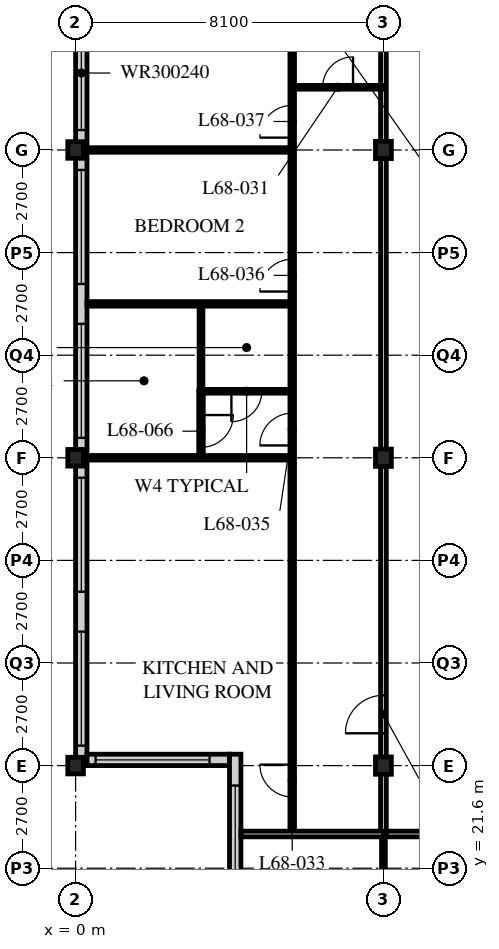
"""IFC4 building model, lengths in metres.
Left out: names, types, materials, properties, quantities, classifications, styles, units other than length and angle.
Written with IfcOpenShell. Run it as: python <this file> out.ifc"""

import sys

from ifc_helpers import new_model, si_unit, direction, frame, frame_2d, origin, origin_2d, place, context, subcontext, project, spatial, rectangle, i_section, extrude, element, fill, save


model = new_model("IFC4")
c1 = context("Model", 3, precision=1e-05, world=origin(), true_north=direction((0.0, 1.0)))
c2 = subcontext(c1, "Body", "Model", "MODEL_VIEW")
j1 = project(units=[si_unit("LENGTHUNIT", "METRE"), si_unit("PLANEANGLEUNIT", "RADIAN")], contexts=[c1])
p1 = place(None, origin())
s1 = spatial("IfcSite", under=j1, at=p1, CompositionType="ELEMENT")
p2 = place(p1, origin())
s2 = spatial("IfcBuilding", under=s1, at=p2, CompositionType="ELEMENT")
p3 = place(p2, frame((0.0, 0.0, 265.8)))
s3 = spatial("IfcBuildingStorey", under=s2, at=p3, CompositionType="ELEMENT", Elevation=265.8)
for number, where, z_axis, x_axis in (
    (1, (0.0, 24.3, 0.0), (0.0, 0.0, 1.0), (1.0, 0.0, 0.0)),
    (2, (0.0, 32.4, 0.0), (0.0, 0.0, 1.0), (1.0, 0.0, 0.0)),
    (3, (0.0, 40.5, 0.0), (0.0, 0.0, 1.0), (1.0, 0.0, 0.0)),
):
    element("IfcColumn", number, at=place(p3, frame(where, z_axis=z_axis, x_axis=x_axis)), inside=s3, PredefinedType="COLUMN", context=c2, shape_type="SweptSolid", body=[
        extrude(i_section(OverallWidth=0.412, OverallDepth=0.437, WebThickness=0.036, FlangeThickness=0.058, FilletRadius=0.015, at=origin_2d()), origin(), (0.0, 0.0, 1.0), 3.9),
    ])
for number, where, z_axis, x_axis in (
    (4, (8.1, 24.3, 0.0), (0.0, 0.0, 1.0), (1.0, 0.0, 0.0)),
    (5, (8.1, 32.4, 0.0), (0.0, 0.0, 1.0), (1.0, 0.0, 0.0)),
    (6, (8.1, 40.5, 0.0), (0.0, 0.0, 1.0), (1.0, 0.0, 0.0)),
):
    element("IfcColumn", number, at=place(p3, frame(where, z_axis=z_axis, x_axis=x_axis)), inside=s3, PredefinedType="COLUMN", context=c2, shape_type="SweptSolid", body=[
        extrude(i_section(OverallWidth=0.418, OverallDepth=0.456, WebThickness=0.042, FlangeThickness=0.067, FilletRadius=0.015, at=origin_2d()), origin(), (0.0, 0.0, 1.0), 3.9),
    ])
p4 = place(p3, frame((0.15, 56.4, 0.0), z_axis=(0.0, 0.0, 1.0), x_axis=(0.0, -1.0, 0.0)))
e7 = element("IfcWall", 7, at=p4, inside=s3, PredefinedType="SOLIDWALL", context=c2, shape_type="SweptSolid", body=[
    extrude(rectangle(XDim=32.1, YDim=0.3, at=frame_2d((16.05, 0.0))), origin(), (0.0, 0.0, 1.0), 3.69),
])
p5 = place(p4, frame((0.225, 0.0, 0.6)))
e8 = element("IfcOpeningElement", 8, at=p5, cuts=e7, PredefinedType="OPENING", context=c2, shape_type="SweptSolid", body=[
    extrude(rectangle(XDim=3.0, YDim=2.4, at=frame_2d((1.5, 1.2))), frame((0.0, 0.16, 0.0), z_axis=(0.0, -1.0, 0.0), x_axis=(1.0, 0.0, 0.0)), (0.0, 0.0, 1.0), 0.32),
])
p6 = place(p4, frame((4.275, 0.0, 0.6)))
e9 = element("IfcOpeningElement", 9, at=p6, cuts=e7, PredefinedType="OPENING", context=c2, shape_type="SweptSolid", body=[
    extrude(rectangle(XDim=3.0, YDim=2.4, at=frame_2d((1.5, 1.2))), frame((0.0, 0.16, 0.0), z_axis=(0.0, -1.0, 0.0), x_axis=(1.0, 0.0, 0.0)), (0.0, 0.0, 1.0), 0.32),
])
p7 = place(p4, frame((8.325, 0.0, 0.6)))
e10 = element("IfcOpeningElement", 10, at=p7, cuts=e7, PredefinedType="OPENING", context=c2, shape_type="SweptSolid", body=[
    extrude(rectangle(XDim=3.0, YDim=2.4, at=frame_2d((1.5, 1.2))), frame((0.0, 0.16, 0.0), z_axis=(0.0, -1.0, 0.0), x_axis=(1.0, 0.0, 0.0)), (0.0, 0.0, 1.0), 0.32),
])
p8 = place(p4, frame((12.375, 0.0, 0.6)))
e11 = element("IfcOpeningElement", 11, at=p8, cuts=e7, PredefinedType="OPENING", context=c2, shape_type="SweptSolid", body=[
    extrude(rectangle(XDim=3.0, YDim=2.4, at=frame_2d((1.5, 1.2))), frame((0.0, 0.16, 0.0), z_axis=(0.0, -1.0, 0.0), x_axis=(1.0, 0.0, 0.0)), (0.0, 0.0, 1.0), 0.32),
])
p9 = place(p4, frame((16.425, 0.0, 0.6)))
e12 = element("IfcOpeningElement", 12, at=p9, cuts=e7, PredefinedType="OPENING", context=c2, shape_type="SweptSolid", body=[
    extrude(rectangle(XDim=3.0, YDim=2.4, at=frame_2d((1.5, 1.2))), frame((0.0, 0.16, 0.0), z_axis=(0.0, -1.0, 0.0), x_axis=(1.0, 0.0, 0.0)), (0.0, 0.0, 1.0), 0.32),
])
p10 = place(p4, frame((20.475, 0.0, 0.6)))
e13 = element("IfcOpeningElement", 13, at=p10, cuts=e7, PredefinedType="OPENING", context=c2, shape_type="SweptSolid", body=[
    extrude(rectangle(XDim=3.0, YDim=2.4, at=frame_2d((1.5, 1.2))), frame((0.0, 0.16, 0.0), z_axis=(0.0, -1.0, 0.0), x_axis=(1.0, 0.0, 0.0)), (0.0, 0.0, 1.0), 0.32),
])
p11 = place(p4, frame((24.525, 0.0, 0.6)))
e14 = element("IfcOpeningElement", 14, at=p11, cuts=e7, PredefinedType="OPENING", context=c2, shape_type="SweptSolid", body=[
    extrude(rectangle(XDim=3.0, YDim=2.4, at=frame_2d((1.5, 1.2))), frame((0.0, 0.16, 0.0), z_axis=(0.0, -1.0, 0.0), x_axis=(1.0, 0.0, 0.0)), (0.0, 0.0, 1.0), 0.32),
])
p12 = place(p4, frame((28.575, 0.0, 0.6)))
e15 = element("IfcOpeningElement", 15, at=p12, cuts=e7, PredefinedType="OPENING", context=c2, shape_type="SweptSolid", body=[
    extrude(rectangle(XDim=3.0, YDim=2.4, at=frame_2d((1.5, 1.2))), frame((0.0, 0.16, 0.0), z_axis=(0.0, -1.0, 0.0), x_axis=(1.0, 0.0, 0.0)), (0.0, 0.0, 1.0), 0.32),
])
p13 = place(p3, frame((0.3, 24.45, 0.0), z_axis=(0.0, 0.0, 1.0), x_axis=(1.0, 0.0, 0.0)))
e16 = element("IfcWall", 16, at=p13, inside=s3, PredefinedType="SOLIDWALL", context=c2, shape_type="SweptSolid", body=[
    extrude(rectangle(XDim=3.75, YDim=0.3, at=frame_2d((1.875, 0.0))), origin(), (0.0, 0.0, 1.0), 3.69),
])
p14 = place(p13, frame((0.225, 0.0, 0.6)))
e17 = element("IfcOpeningElement", 17, at=p14, cuts=e16, PredefinedType="OPENING", context=c2, shape_type="SweptSolid", body=[
    extrude(rectangle(XDim=3.0, YDim=2.3, at=frame_2d((1.5, 1.15))), frame((0.0, 0.16, 0.0), z_axis=(0.0, -1.0, 0.0), x_axis=(1.0, 0.0, 0.0)), (0.0, 0.0, 1.0), 0.32),
])
p15 = place(p3, frame((4.2, 24.6, 0.0), z_axis=(0.0, 0.0, 1.0), x_axis=(0.0, -1.0, 0.0)))
e18 = element("IfcWall", 18, at=p15, inside=s3, PredefinedType="SOLIDWALL", context=c2, shape_type="SweptSolid", body=[
    extrude(rectangle(XDim=4.35, YDim=0.3, at=frame_2d((2.175, 0.0))), origin(), (0.0, 0.0, 1.0), 3.69),
])
p16 = place(p15, frame((0.825, 0.0, 0.6)))
e19 = element("IfcOpeningElement", 19, at=p16, cuts=e18, PredefinedType="OPENING", context=c2, shape_type="SweptSolid", body=[
    extrude(rectangle(XDim=3.0, YDim=2.3, at=frame_2d((1.5, 1.15))), frame((0.0, 0.16, 0.0), z_axis=(0.0, -1.0, 0.0), x_axis=(1.0, 0.0, 0.0)), (0.0, 0.0, 1.0), 0.32),
])
p17 = place(p3, frame((8.1, 22.5, 0.0), z_axis=(0.0, 0.0, 1.0), x_axis=(1.0, 0.0, 0.0)))
e20 = element("IfcWall", 20, at=p17, inside=s3, PredefinedType="PARTITIONING", context=c2, shape_type="SweptSolid", body=[
    extrude(rectangle(XDim=28.35, YDim=0.15, at=frame_2d((14.175, 0.0))), origin(), (0.0, 0.0, 1.0), 3.69),
])
p18 = place(p17, frame((4.45, 0.0, 0.0)))
e21 = element("IfcOpeningElement", 21, at=p18, cuts=e20, PredefinedType="OPENING", context=c2, shape_type="SweptSolid", body=[
    extrude(rectangle(XDim=1.0, YDim=2.1, at=frame_2d((0.5, 1.05))), frame((0.0, 0.085, 0.0), z_axis=(0.0, -1.0, 0.0), x_axis=(1.0, 0.0, 0.0)), (0.0, 0.0, 1.0), 0.17),
])
p19 = place(p17, frame((12.55, 0.0, 0.0)))
e22 = element("IfcOpeningElement", 22, at=p19, cuts=e20, PredefinedType="OPENING", context=c2, shape_type="SweptSolid", body=[
    extrude(rectangle(XDim=1.0, YDim=2.1, at=frame_2d((0.5, 1.05))), frame((0.0, 0.085, 0.0), z_axis=(0.0, -1.0, 0.0), x_axis=(1.0, 0.0, 0.0)), (0.0, 0.0, 1.0), 0.17),
])
p20 = place(p17, frame((20.65, 0.0, 0.0)))
e23 = element("IfcOpeningElement", 23, at=p20, cuts=e20, PredefinedType="OPENING", context=c2, shape_type="SweptSolid", body=[
    extrude(rectangle(XDim=1.0, YDim=2.1, at=frame_2d((0.5, 1.05))), frame((0.0, 0.085, 0.0), z_axis=(0.0, -1.0, 0.0), x_axis=(1.0, 0.0, 0.0)), (0.0, 0.0, 1.0), 0.17),
])
p21 = place(p17, frame((2.625, 0.0, 0.0)))
e24 = element("IfcOpeningElement", 24, at=p21, cuts=e20, PredefinedType="OPENING", context=c2, shape_type="SweptSolid", body=[
    extrude(rectangle(XDim=1.0, YDim=2.1, at=frame_2d((0.5, 1.05))), frame((0.0, 0.085, 0.0), z_axis=(0.0, -1.0, 0.0), x_axis=(1.0, 0.0, 0.0)), (0.0, 0.0, 1.0), 0.17),
])
p22 = place(p3, frame((8.1, 22.5, 0.0), z_axis=(0.0, 0.0, 1.0), x_axis=(0.0, 1.0, 0.0)))
e25 = element("IfcWall", 25, at=p22, inside=s3, PredefinedType="PARTITIONING", context=c2, shape_type="SweptSolid", body=[
    extrude(rectangle(XDim=26.1, YDim=0.15, at=frame_2d((13.05, 0.0))), origin(), (0.0, 0.0, 1.0), 3.078),
])
p23 = place(p22, frame((2.65, 0.0, 0.0)))
e26 = element("IfcOpeningElement", 26, at=p23, cuts=e25, PredefinedType="OPENING", context=c2, shape_type="SweptSolid", body=[
    extrude(rectangle(XDim=1.0, YDim=2.1, at=frame_2d((0.5, 1.05))), frame((0.0, 0.085, 0.0), z_axis=(0.0, -1.0, 0.0), x_axis=(1.0, 0.0, 0.0)), (0.0, 0.0, 1.0), 0.17),
])
p24 = place(p22, frame((22.75, 0.0, 0.0)))
e27 = element("IfcOpeningElement", 27, at=p24, cuts=e25, PredefinedType="OPENING", context=c2, shape_type="SweptSolid", body=[
    extrude(rectangle(XDim=1.0, YDim=2.1, at=frame_2d((0.5, 1.05))), frame((0.0, 0.085, 0.0), z_axis=(0.0, -1.0, 0.0), x_axis=(1.0, 0.0, 0.0)), (0.0, 0.0, 1.0), 0.17),
])
p25 = place(p3, frame((5.7, 22.5, 0.0), z_axis=(0.0, 0.0, 1.0), x_axis=(0.0, 1.0, 0.0)))
e28 = element("IfcWall", 28, at=p25, inside=s3, PredefinedType="PARTITIONING", context=c2, shape_type="SweptSolid", body=[
    extrude(rectangle(XDim=22.05, YDim=0.12, at=frame_2d((11.025, 0.0))), origin(), (0.0, 0.0, 1.0), 3.69),
])
p26 = place(p25, frame((0.975, 0.0, 0.0)))
e29 = element("IfcOpeningElement", 29, at=p26, cuts=e28, PredefinedType="OPENING", context=c2, shape_type="SweptSolid", body=[
    extrude(rectangle(XDim=0.85, YDim=2.1, at=frame_2d((0.425, 1.05))), frame((0.0, 0.07, 0.0), z_axis=(0.0, -1.0, 0.0), x_axis=(1.0, 0.0, 0.0)), (0.0, 0.0, 1.0), 0.14),
])
p27 = place(p25, frame((10.225, 0.0, 0.0)))
e30 = element("IfcOpeningElement", 30, at=p27, cuts=e28, PredefinedType="OPENING", context=c2, shape_type="SweptSolid", body=[
    extrude(rectangle(XDim=0.85, YDim=2.1, at=frame_2d((0.425, 1.05))), frame((0.0, 0.07, 0.0), z_axis=(0.0, -1.0, 0.0), x_axis=(1.0, 0.0, 0.0)), (0.0, 0.0, 1.0), 0.14),
])
p28 = place(p25, frame((14.275, 0.0, 0.0)))
e31 = element("IfcOpeningElement", 31, at=p28, cuts=e28, PredefinedType="OPENING", context=c2, shape_type="SweptSolid", body=[
    extrude(rectangle(XDim=0.85, YDim=2.1, at=frame_2d((0.425, 1.05))), frame((0.0, 0.07, 0.0), z_axis=(0.0, -1.0, 0.0), x_axis=(1.0, 0.0, 0.0)), (0.0, 0.0, 1.0), 0.14),
])
p29 = place(p25, frame((18.325, 0.0, 0.0)))
e32 = element("IfcOpeningElement", 32, at=p29, cuts=e28, PredefinedType="OPENING", context=c2, shape_type="SweptSolid", body=[
    extrude(rectangle(XDim=0.85, YDim=2.1, at=frame_2d((0.425, 1.05))), frame((0.0, 0.07, 0.0), z_axis=(0.0, -1.0, 0.0), x_axis=(1.0, 0.0, 0.0)), (0.0, 0.0, 1.0), 0.14),
])
p30 = place(p3, frame((8.1, 42.15, 0.0), z_axis=(0.0, 0.0, 1.0), x_axis=(-1.0, 0.0, 0.0)))
e33 = element("IfcWall", 33, at=p30, inside=s3, PredefinedType="PARTITIONING", context=c2, shape_type="SweptSolid", body=[
    extrude(rectangle(XDim=2.4, YDim=0.1, at=frame_2d((1.2, 0.0))), origin(), (0.0, 0.0, 1.0), 3.69),
])
p31 = place(p30, frame((0.8, 0.0, 0.0)))
e34 = element("IfcOpeningElement", 34, at=p31, cuts=e33, PredefinedType="OPENING", context=c2, shape_type="SweptSolid", body=[
    extrude(rectangle(XDim=0.8, YDim=2.1, at=frame_2d((0.4, 1.05))), frame((0.0, 0.06, 0.0), z_axis=(0.0, -1.0, 0.0), x_axis=(1.0, 0.0, 0.0)), (0.0, 0.0, 1.0), 0.12),
])
p32 = place(p3, frame((5.7, 34.15, 0.0), z_axis=(0.0, 0.0, 1.0), x_axis=(-1.0, 0.0, 0.0)))
e35 = element("IfcWall", 35, at=p32, inside=s3, PredefinedType="PARTITIONING", context=c2, shape_type="SweptSolid", body=[
    extrude(rectangle(XDim=2.4, YDim=0.1, at=frame_2d((1.2, 0.0))), origin(), (0.0, 0.0, 1.0), 3.69),
])
p33 = place(p32, frame((0.8, 0.0, 0.0)))
e36 = element("IfcOpeningElement", 36, at=p33, cuts=e35, PredefinedType="OPENING", context=c2, shape_type="SweptSolid", body=[
    extrude(rectangle(XDim=0.8, YDim=2.1, at=frame_2d((0.4, 1.05))), frame((0.0, 0.06, 0.0), z_axis=(0.0, -1.0, 0.0), x_axis=(1.0, 0.0, 0.0)), (0.0, 0.0, 1.0), 0.12),
])
p34 = place(p3, frame((3.3, 34.15, 0.0), z_axis=(0.0, 0.0, 1.0), x_axis=(0.0, 1.0, 0.0)))
e37 = element("IfcWall", 37, at=p34, inside=s3, PredefinedType="PARTITIONING", context=c2, shape_type="SweptSolid", body=[
    extrude(rectangle(XDim=2.3, YDim=0.1, at=frame_2d((1.15, 0.0))), origin(), (0.0, 0.0, 1.0), 3.69),
])
p35 = place(p3, frame((5.7, 32.4, 0.0), z_axis=(0.0, 0.0, 1.0), x_axis=(-1.0, 0.0, 0.0)))
e38 = element("IfcWall", 38, at=p35, inside=s3, PredefinedType="PARTITIONING", context=c2, shape_type="SweptSolid", body=[
    extrude(rectangle(XDim=5.4, YDim=0.12, at=frame_2d((2.7, 0.0))), origin(), (0.0, 0.0, 1.0), 3.078),
])
p36 = place(p3, frame((5.7, 36.45, 0.0), z_axis=(0.0, 0.0, 1.0), x_axis=(-1.0, 0.0, 0.0)))
e39 = element("IfcWall", 39, at=p36, inside=s3, PredefinedType="PARTITIONING", context=c2, shape_type="SweptSolid", body=[
    extrude(rectangle(XDim=5.4, YDim=0.12, at=frame_2d((2.7, 0.0))), origin(), (0.0, 0.0, 1.0), 3.69),
])
p37 = place(p3, frame((5.7, 40.5, 0.0), z_axis=(0.0, 0.0, 1.0), x_axis=(-1.0, 0.0, 0.0)))
e40 = element("IfcWall", 40, at=p37, inside=s3, PredefinedType="PARTITIONING", context=c2, shape_type="SweptSolid", body=[
    extrude(rectangle(XDim=5.4, YDim=0.12, at=frame_2d((2.7, 0.0))), origin(), (0.0, 0.0, 1.0), 3.078),
])
p38 = place(p3, frame((8.1, 22.5, 0.0), z_axis=(0.0, 0.0, 1.0), x_axis=(0.0, -1.0, 0.0)))
e41 = element("IfcWall", 41, at=p38, inside=s3, PredefinedType="PARTITIONING", context=c2, shape_type="SweptSolid", body=[
    extrude(rectangle(XDim=1.95, YDim=0.1, at=frame_2d((0.975, 0.0))), origin(), (0.0, 0.0, 1.0), 3.078),
])
p39 = place(p3, frame((4.35, 22.5, 0.0), z_axis=(0.0, 0.0, 1.0), x_axis=(1.0, 0.0, 0.0)))
e42 = element("IfcWall", 42, at=p39, inside=s3, PredefinedType="PARTITIONING", context=c2, shape_type="SweptSolid", body=[
    extrude(rectangle(XDim=3.75, YDim=0.15, at=frame_2d((1.875, 0.0))), origin(), (0.0, 0.0, 1.0), 3.69),
])
p40 = place(p3, frame((3.3, 32.4, 0.0), z_axis=(0.0, 0.0, 1.0), x_axis=(0.0, 1.0, 0.0)))
e43 = element("IfcWall", 43, at=p40, inside=s3, PredefinedType="PARTITIONING", context=c2, shape_type="SweptSolid", body=[
    extrude(rectangle(XDim=1.76, YDim=0.12, at=frame_2d((0.88, 0.0))), origin(), (0.0, 0.0, 1.0), 3.69),
])
p41 = place(p40, frame((0.275, 0.0, 0.0)))
e44 = element("IfcOpeningElement", 44, at=p41, cuts=e43, PredefinedType="OPENING", context=c2, shape_type="SweptSolid", body=[
    extrude(rectangle(XDim=0.85, YDim=2.1, at=frame_2d((0.425, 1.05))), frame((0.0, 0.07, 0.0), z_axis=(0.0, -1.0, 0.0), x_axis=(1.0, 0.0, 0.0)), (0.0, 0.0, 1.0), 0.14),
])
p42 = place(p8, origin())
e45 = element("IfcWindow", 45, at=p42, inside=s3, PartitioningType="SINGLE_PANEL", PredefinedType="WINDOW", context=c2, shape_type="SweptSolid", body=[
    extrude(rectangle(XDim=3.0, YDim=2.4, at=frame_2d((1.5, 1.2))), frame((0.0, 0.03, 0.0), z_axis=(0.0, -1.0, 0.0), x_axis=(1.0, 0.0, 0.0)), (0.0, 0.0, 1.0), 0.06),
])
fill(e11, e45)
p43 = place(p9, origin())
e46 = element("IfcWindow", 46, at=p43, inside=s3, PartitioningType="SINGLE_PANEL", PredefinedType="WINDOW", context=c2, shape_type="SweptSolid", body=[
    extrude(rectangle(XDim=3.0, YDim=2.4, at=frame_2d((1.5, 1.2))), frame((0.0, 0.03, 0.0), z_axis=(0.0, -1.0, 0.0), x_axis=(1.0, 0.0, 0.0)), (0.0, 0.0, 1.0), 0.06),
])
fill(e12, e46)
p44 = place(p10, origin())
e47 = element("IfcWindow", 47, at=p44, inside=s3, PartitioningType="SINGLE_PANEL", PredefinedType="WINDOW", context=c2, shape_type="SweptSolid", body=[
    extrude(rectangle(XDim=3.0, YDim=2.4, at=frame_2d((1.5, 1.2))), frame((0.0, 0.03, 0.0), z_axis=(0.0, -1.0, 0.0), x_axis=(1.0, 0.0, 0.0)), (0.0, 0.0, 1.0), 0.06),
])
fill(e13, e47)
p45 = place(p11, origin())
e48 = element("IfcWindow", 48, at=p45, inside=s3, PartitioningType="SINGLE_PANEL", PredefinedType="WINDOW", context=c2, shape_type="SweptSolid", body=[
    extrude(rectangle(XDim=3.0, YDim=2.4, at=frame_2d((1.5, 1.2))), frame((0.0, 0.03, 0.0), z_axis=(0.0, -1.0, 0.0), x_axis=(1.0, 0.0, 0.0)), (0.0, 0.0, 1.0), 0.06),
])
fill(e14, e48)
p46 = place(p12, origin())
e49 = element("IfcWindow", 49, at=p46, inside=s3, PartitioningType="SINGLE_PANEL", PredefinedType="WINDOW", context=c2, shape_type="SweptSolid", body=[
    extrude(rectangle(XDim=3.0, YDim=2.4, at=frame_2d((1.5, 1.2))), frame((0.0, 0.03, 0.0), z_axis=(0.0, -1.0, 0.0), x_axis=(1.0, 0.0, 0.0)), (0.0, 0.0, 1.0), 0.06),
])
fill(e15, e49)
p47 = place(p14, origin())
e50 = element("IfcWindow", 50, at=p47, inside=s3, PartitioningType="SINGLE_PANEL", PredefinedType="WINDOW", context=c2, shape_type="SweptSolid", body=[
    extrude(rectangle(XDim=3.0, YDim=2.3, at=frame_2d((1.5, 1.15))), frame((0.0, 0.03, 0.0), z_axis=(0.0, -1.0, 0.0), x_axis=(1.0, 0.0, 0.0)), (0.0, 0.0, 1.0), 0.06),
])
fill(e17, e50)
p48 = place(p16, origin())
e51 = element("IfcWindow", 51, at=p48, inside=s3, PartitioningType="SINGLE_PANEL", PredefinedType="WINDOW", context=c2, shape_type="SweptSolid", body=[
    extrude(rectangle(XDim=3.0, YDim=2.3, at=frame_2d((1.5, 1.15))), frame((0.0, 0.03, 0.0), z_axis=(0.0, -1.0, 0.0), x_axis=(1.0, 0.0, 0.0)), (0.0, 0.0, 1.0), 0.06),
])
fill(e19, e51)
p49 = place(p31, origin())
e52 = element("IfcDoor", 52, at=p49, inside=s3, OperationType="SINGLE_SWING_RIGHT", PredefinedType="DOOR", context=c2, shape_type="SweptSolid", body=[
    extrude(rectangle(XDim=0.8, YDim=2.1, at=frame_2d((0.4, 1.05))), frame((0.0, 0.025, 0.0), z_axis=(0.0, -1.0, 0.0), x_axis=(1.0, 0.0, 0.0)), (0.0, 0.0, 1.0), 0.05),
])
fill(e34, e52)
p50 = place(p23, origin())
e53 = element("IfcDoor", 53, at=p50, inside=s3, OperationType="SINGLE_SWING_LEFT", PredefinedType="DOOR", context=c2, shape_type="SweptSolid", body=[
    extrude(rectangle(XDim=1.0, YDim=2.1, at=frame_2d((0.5, 1.05))), frame((0.0, 0.025, 0.0), z_axis=(0.0, -1.0, 0.0), x_axis=(1.0, 0.0, 0.0)), (0.0, 0.0, 1.0), 0.05),
])
fill(e26, e53)
p51 = place(p26, origin())
e54 = element("IfcDoor", 54, at=p51, inside=s3, OperationType="SINGLE_SWING_RIGHT", PredefinedType="DOOR", context=c2, shape_type="SweptSolid", body=[
    extrude(rectangle(XDim=0.85, YDim=2.1, at=frame_2d((0.425, 1.05))), frame((0.0, 0.025, 0.0), z_axis=(0.0, -1.0, 0.0), x_axis=(1.0, 0.0, 0.0)), (0.0, 0.0, 1.0), 0.05),
])
fill(e29, e54)
p52 = place(p33, origin())
e55 = element("IfcDoor", 55, at=p52, inside=s3, OperationType="SINGLE_SWING_RIGHT", PredefinedType="DOOR", context=c2, shape_type="SweptSolid", body=[
    extrude(rectangle(XDim=0.8, YDim=2.1, at=frame_2d((0.4, 1.05))), frame((0.0, 0.025, 0.0), z_axis=(0.0, -1.0, 0.0), x_axis=(1.0, 0.0, 0.0)), (0.0, 0.0, 1.0), 0.05),
])
fill(e36, e55)
p53 = place(p27, origin())
e56 = element("IfcDoor", 56, at=p53, inside=s3, OperationType="SINGLE_SWING_LEFT", PredefinedType="DOOR", context=c2, shape_type="SweptSolid", body=[
    extrude(rectangle(XDim=0.85, YDim=2.1, at=frame_2d((0.425, 1.05))), frame((0.0, 0.025, 0.0), z_axis=(0.0, -1.0, 0.0), x_axis=(1.0, 0.0, 0.0)), (0.0, 0.0, 1.0), 0.05),
])
fill(e30, e56)
p54 = place(p28, origin())
e57 = element("IfcDoor", 57, at=p54, inside=s3, OperationType="SINGLE_SWING_LEFT", PredefinedType="DOOR", context=c2, shape_type="SweptSolid", body=[
    extrude(rectangle(XDim=0.85, YDim=2.1, at=frame_2d((0.425, 1.05))), frame((0.0, 0.025, 0.0), z_axis=(0.0, -1.0, 0.0), x_axis=(1.0, 0.0, 0.0)), (0.0, 0.0, 1.0), 0.05),
])
fill(e31, e57)
p55 = place(p29, origin())
e58 = element("IfcDoor", 58, at=p55, inside=s3, OperationType="SINGLE_SWING_LEFT", PredefinedType="DOOR", context=c2, shape_type="SweptSolid", body=[
    extrude(rectangle(XDim=0.85, YDim=2.1, at=frame_2d((0.425, 1.05))), frame((0.0, 0.025, 0.0), z_axis=(0.0, -1.0, 0.0), x_axis=(1.0, 0.0, 0.0)), (0.0, 0.0, 1.0), 0.05),
])
fill(e32, e58)
p56 = place(p41, origin())
e59 = element("IfcDoor", 59, at=p56, inside=s3, OperationType="SINGLE_SWING_LEFT", PredefinedType="DOOR", context=c2, shape_type="SweptSolid", body=[
    extrude(rectangle(XDim=0.85, YDim=2.1, at=frame_2d((0.425, 1.05))), frame((0.0, 0.025, 0.0), z_axis=(0.0, -1.0, 0.0), x_axis=(1.0, 0.0, 0.0)), (0.0, 0.0, 1.0), 0.05),
])
fill(e44, e59)
save(model, sys.argv[1])
